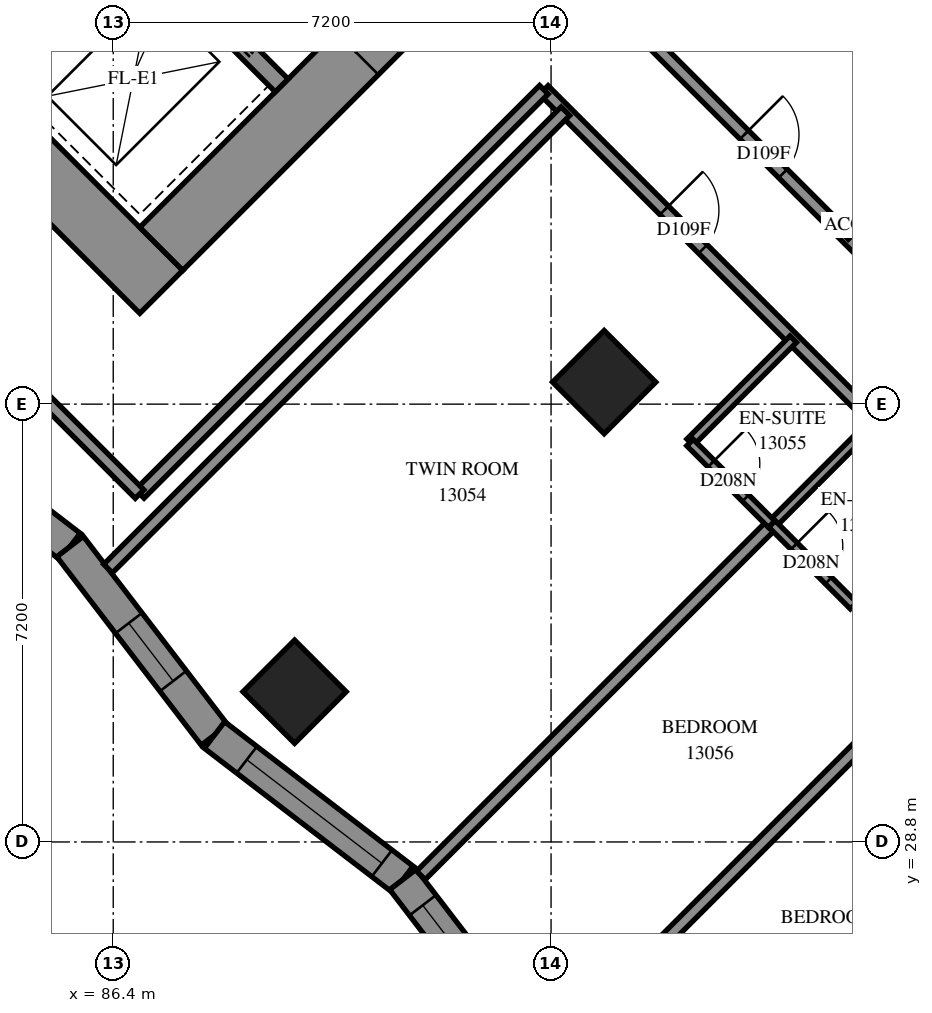
"""IFC4 building model, lengths in metres.
Left out: names, types, materials, properties, quantities, classifications, styles, units other than length and angle.
Written with IfcOpenShell. Run it as: python <this file> out.ifc"""

import sys

from ifc_helpers import new_model, si_unit, direction, frame, frame_2d, origin, origin_2d, place, context, subcontext, project, spatial, polyline, rectangle, outline, extrude, element, fill, save


model = new_model("IFC4")
c1 = context("Model", 3, precision=1e-05, world=origin(), true_north=direction((0.0, 1.0)))
c2 = subcontext(c1, "Body", "Model", "MODEL_VIEW")
j1 = project(units=[si_unit("LENGTHUNIT", "METRE"), si_unit("PLANEANGLEUNIT", "RADIAN")], contexts=[c1])
p1 = place(None, origin())
s1 = spatial("IfcSite", under=j1, at=p1, CompositionType="ELEMENT")
p2 = place(p1, origin())
s2 = spatial("IfcBuilding", under=s1, at=p2, CompositionType="ELEMENT")
p3 = place(p2, frame((0.0, 0.0, 50.8)))
s3 = spatial("IfcBuildingStorey", under=s2, at=p3, CompositionType="ELEMENT", Elevation=50.8)
for number, where, z_axis, x_axis in (
    (1, (94.474, 36.362, 0.0), (0.0, 0.0, 1.0), (0.707, -0.707, 0.0)),
    (2, (89.382, 31.271, 0.0), (0.0, 0.0, 1.0), (0.707, -0.707, 0.0)),
):
    element("IfcColumn", number, at=place(p3, frame(where, z_axis=z_axis, x_axis=x_axis)), inside=s3, PredefinedType="COLUMN", context=c2, shape_type="SweptSolid", body=[
        extrude(rectangle(XDim=1.2, YDim=1.2, at=origin_2d()), origin(), (0.0, 0.0, 1.0), 3.1),
    ])
p4 = place(p3, frame((75.594, 49.443, -0.3), z_axis=(0.0, 0.0, 1.0), x_axis=(0.7071037324, -0.70710983, 0.0)))
e3 = element("IfcWall", 3, at=p4, inside=s3, PredefinedType="SHEAR", context=c2, shape_type="SweptSolid", body=[
    extrude(rectangle(XDim=16.4, YDim=1.0, at=frame_2d((8.2, 0.0))), origin(), (0.0, 0.0, 1.0), 2.7),
])
p5 = place(p3, frame((87.19, 38.554, -0.3), z_axis=(0.0, 0.0, 1.0), x_axis=(0.707103309, 0.7071102534, 0.0)))
e4 = element("IfcWall", 4, at=p5, inside=s3, PredefinedType="SHEAR", context=c2, shape_type="SweptSolid", body=[
    extrude(rectangle(XDim=14.4, YDim=1.0, at=frame_2d((7.2, 0.0))), origin(), (0.0, 0.0, 1.0), 2.7),
])
p6 = place(p5, frame((4.55, 0.0, 0.3)))
e5 = element("IfcOpeningElement", 5, at=p6, cuts=e4, PredefinedType="OPENING", context=c2, shape_type="SweptSolid", body=[
    extrude(rectangle(XDim=1.1, YDim=2.1, at=frame_2d((0.55, 1.05))), frame((0.0, 0.51, 0.0), z_axis=(0.0, -1.0, 0.0), x_axis=(1.0, 0.0, 0.0)), (0.0, 0.0, 1.0), 1.02),
])
p7 = place(p5, frame((11.35, 0.0, 0.3)))
e6 = element("IfcOpeningElement", 6, at=p7, cuts=e4, PredefinedType="OPENING", context=c2, shape_type="SweptSolid", body=[
    extrude(rectangle(XDim=1.1, YDim=2.1, at=frame_2d((0.55, 1.05))), frame((0.0, 0.51, 0.0), z_axis=(0.0, -1.0, 0.0), x_axis=(1.0, 0.0, 0.0)), (0.0, 0.0, 1.0), 1.02),
])
p8 = place(p3, frame((84.291, 41.453, 0.0), z_axis=(0.0, 0.0, 1.0), x_axis=(0.7071067812, 0.7071067812, 0.0)))
e7 = element("IfcWall", 7, at=p8, inside=s3, PredefinedType="SOLIDWALL", context=c2, shape_type="SweptSolid", body=[
    extrude(rectangle(XDim=3.3, YDim=0.3, at=frame_2d((1.65, 0.0))), origin(), (0.0, 0.0, 1.0), 3.1),
])
p9 = place(p3, frame((78.988, 51.423, 0.0), z_axis=(0.0, 0.0, 1.0), x_axis=(0.7071067812, -0.7071067812, 0.0)))
e8 = element("IfcWall", 8, at=p9, inside=s3, PredefinedType="SOLIDWALL", context=c2, shape_type="SweptSolid", body=[
    extrude(rectangle(XDim=14.4, YDim=0.3, at=frame_2d((7.2, 0.0))), origin(), (0.0, 0.0, 1.0), 3.1),
])
p10 = place(p9, frame((1.25, 0.0, 0.0)))
e9 = element("IfcOpeningElement", 9, at=p10, cuts=e8, PredefinedType="OPENING", context=c2, shape_type="SweptSolid", body=[
    extrude(rectangle(XDim=1.1, YDim=2.1, at=frame_2d((0.55, 1.05))), frame((0.0, 0.16, 0.0), z_axis=(0.0, -1.0, 0.0), x_axis=(1.0, 0.0, 0.0)), (0.0, 0.0, 1.0), 0.32),
])
p11 = place(p9, frame((4.85, 0.0, 0.0)))
e10 = element("IfcOpeningElement", 10, at=p11, cuts=e8, PredefinedType="OPENING", context=c2, shape_type="SweptSolid", body=[
    extrude(rectangle(XDim=1.1, YDim=2.1, at=frame_2d((0.55, 1.05))), frame((0.0, 0.16, 0.0), z_axis=(0.0, -1.0, 0.0), x_axis=(1.0, 0.0, 0.0)), (0.0, 0.0, 1.0), 0.32),
])
p12 = place(p9, frame((8.45, 0.0, 0.0)))
e11 = element("IfcOpeningElement", 11, at=p12, cuts=e8, PredefinedType="OPENING", context=c2, shape_type="SweptSolid", body=[
    extrude(rectangle(XDim=1.1, YDim=2.1, at=frame_2d((0.55, 1.05))), frame((0.0, 0.16, 0.0), z_axis=(0.0, -1.0, 0.0), x_axis=(1.0, 0.0, 0.0)), (0.0, 0.0, 1.0), 0.32),
])
p13 = place(p9, frame((12.05, 0.0, 0.0)))
e12 = element("IfcOpeningElement", 12, at=p13, cuts=e8, PredefinedType="OPENING", context=c2, shape_type="SweptSolid", body=[
    extrude(rectangle(XDim=1.1, YDim=2.1, at=frame_2d((0.55, 1.05))), frame((0.0, 0.16, 0.0), z_axis=(0.0, -1.0, 0.0), x_axis=(1.0, 0.0, 0.0)), (0.0, 0.0, 1.0), 0.32),
])
p14 = place(p3, frame((82.591, 36.034, 0.0), z_axis=(0.0, 0.0, 1.0), x_axis=(0.7937155717, -0.6082890689, 0.0)))
e13 = element("IfcWall", 13, at=p14, inside=s3, PredefinedType="SOLIDWALL", context=c2, shape_type="SweptSolid", body=[
    extrude(outline(polyline([(-0.036, -0.275), (3.869, -0.275), (3.941, 0.275), (0.036, 0.275), (-0.036, -0.275)])), origin(), (0.0, 0.0, 1.0), 3.1),
])
p15 = place(p14, frame((1.742, 0.0, 0.5)))
e14 = element("IfcOpeningElement", 14, at=p15, cuts=e13, PredefinedType="OPENING", context=c2, shape_type="SweptSolid", body=[
    extrude(rectangle(XDim=1.2, YDim=2.45, at=frame_2d((0.6, 1.225))), frame((0.0, 0.285, 0.0), z_axis=(0.0, -1.0, 0.0), x_axis=(1.0, 0.0, 0.0)), (0.0, 0.0, 1.0), 0.57),
])
p16 = place(p3, frame((85.69, 33.658, 0.0), z_axis=(0.0, 0.0, 1.0), x_axis=(0.6082890689, -0.7937155717, 0.0)))
e15 = element("IfcWall", 15, at=p16, inside=s3, PredefinedType="SOLIDWALL", context=c2, shape_type="SweptSolid", body=[
    extrude(outline(polyline([(0.036, -0.275), (3.941, -0.275), (3.869, 0.275), (-0.036, 0.275), (0.036, -0.275)])), origin(), (0.0, 0.0, 1.0), 3.1),
])
p17 = place(p16, frame((1.587, 0.0, 0.5)))
e16 = element("IfcOpeningElement", 16, at=p17, cuts=e15, PredefinedType="OPENING", context=c2, shape_type="SweptSolid", body=[
    extrude(rectangle(XDim=1.2, YDim=2.45, at=frame_2d((0.6, 1.225))), frame((0.0, 0.285, 0.0), z_axis=(0.0, -1.0, 0.0), x_axis=(1.0, 0.0, 0.0)), (0.0, 0.0, 1.0), 0.57),
])
p18 = place(p3, frame((88.065, 30.559, 0.0), z_axis=(0.0, 0.0, 1.0), x_axis=(0.7937184601, -0.6082852999, 0.0)))
e17 = element("IfcWall", 17, at=p18, inside=s3, PredefinedType="SOLIDWALL", context=c2, shape_type="SweptSolid", body=[
    extrude(outline(polyline([(-0.036, -0.275), (3.869, -0.275), (3.941, 0.275), (0.036, 0.275), (-0.036, -0.275)])), origin(), (0.0, 0.0, 1.0), 3.1),
])
p19 = place(p18, frame((0.668, 0.0, 0.5)))
e18 = element("IfcOpeningElement", 18, at=p19, cuts=e17, PredefinedType="OPENING", context=c2, shape_type="SweptSolid", body=[
    extrude(rectangle(XDim=2.8, YDim=2.45, at=frame_2d((1.4, 1.225))), frame((0.0, 0.285, 0.0), z_axis=(0.0, -1.0, 0.0), x_axis=(1.0, 0.0, 0.0)), (0.0, 0.0, 1.0), 0.57),
])
p20 = place(p3, frame((91.165, 28.183, 0.0), z_axis=(0.0, 0.0, 1.0), x_axis=(0.6082890689, -0.7937155717, 0.0)))
e19 = element("IfcWall", 19, at=p20, inside=s3, PredefinedType="SOLIDWALL", context=c2, shape_type="SweptSolid", body=[
    extrude(outline(polyline([(0.036, -0.275), (3.941, -0.275), (3.869, 0.275), (-0.036, 0.275), (0.036, -0.275)])), origin(), (0.0, 0.0, 1.0), 3.1),
])
p21 = place(p20, frame((0.534, 0.0, 0.5)))
e20 = element("IfcOpeningElement", 20, at=p21, cuts=e19, PredefinedType="OPENING", context=c2, shape_type="SweptSolid", body=[
    extrude(rectangle(XDim=2.8, YDim=2.45, at=frame_2d((1.4, 1.225))), frame((0.0, 0.285, 0.0), z_axis=(0.0, -1.0, 0.0), x_axis=(1.0, 0.0, 0.0)), (0.0, 0.0, 1.0), 0.57),
])
p22 = place(p3, frame((93.481, 41.167, 0.0), z_axis=(0.0, 0.0, 1.0), x_axis=(0.7071067812, -0.7071067812, 0.0)))
e21 = element("IfcWall", 21, at=p22, inside=s3, PredefinedType="PARTITIONING", context=c2, shape_type="SweptSolid", body=[
    extrude(rectangle(XDim=25.699, YDim=0.2, at=frame_2d((12.85, 0.0))), origin(), (0.0, 0.0, 1.0), 3.1),
])
p23 = place(p22, frame((2.8, 0.0, 0.0)))
e22 = element("IfcOpeningElement", 22, at=p23, cuts=e21, PredefinedType="OPENING", context=c2, shape_type="SweptSolid", body=[
    extrude(rectangle(XDim=0.9, YDim=2.1, at=frame_2d((0.45, 1.05))), frame((0.0, 0.11, 0.0), z_axis=(0.0, -1.0, 0.0), x_axis=(1.0, 0.0, 0.0)), (0.0, 0.0, 1.0), 0.22),
])
p24 = place(p22, frame((9.948, 0.0, 0.0)))
e23 = element("IfcOpeningElement", 23, at=p24, cuts=e21, PredefinedType="OPENING", context=c2, shape_type="SweptSolid", body=[
    extrude(rectangle(XDim=0.9, YDim=2.1, at=frame_2d((0.45, 1.05))), frame((0.0, 0.11, 0.0), z_axis=(0.0, -1.0, 0.0), x_axis=(1.0, 0.0, 0.0)), (0.0, 0.0, 1.0), 0.22),
])
p25 = place(p22, frame((11.7, 0.0, 0.0)))
e24 = element("IfcOpeningElement", 24, at=p25, cuts=e21, PredefinedType="OPENING", context=c2, shape_type="SweptSolid", body=[
    extrude(rectangle(XDim=0.9, YDim=2.1, at=frame_2d((0.45, 1.05))), frame((0.0, 0.11, 0.0), z_axis=(0.0, -1.0, 0.0), x_axis=(1.0, 0.0, 0.0)), (0.0, 0.0, 1.0), 0.22),
])
p26 = place(p22, frame((17.25, 0.0, 0.0)))
e25 = element("IfcOpeningElement", 25, at=p26, cuts=e21, PredefinedType="OPENING", context=c2, shape_type="SweptSolid", body=[
    extrude(rectangle(XDim=0.9, YDim=2.1, at=frame_2d((0.45, 1.05))), frame((0.0, 0.11, 0.0), z_axis=(0.0, -1.0, 0.0), x_axis=(1.0, 0.0, 0.0)), (0.0, 0.0, 1.0), 0.22),
])
p27 = place(p22, frame((22.82, 0.0, 0.0)))
e26 = element("IfcOpeningElement", 26, at=p27, cuts=e21, PredefinedType="OPENING", context=c2, shape_type="SweptSolid", body=[
    extrude(rectangle(XDim=0.9, YDim=2.1, at=frame_2d((0.45, 1.05))), frame((0.0, 0.11, 0.0), z_axis=(0.0, -1.0, 0.0), x_axis=(1.0, 0.0, 0.0)), (0.0, 0.0, 1.0), 0.22),
])
p28 = place(p3, frame((86.314, 33.295, 0.0), z_axis=(0.0, 0.0, 1.0), x_axis=(0.7071020809, 0.7071114814, 0.0)))
e27 = element("IfcWall", 27, at=p28, inside=s3, PredefinedType="PARTITIONING", context=c2, shape_type="SweptSolid", body=[
    extrude(rectangle(XDim=10.638, YDim=0.2, at=frame_2d((5.319, 0.0))), origin(), (0.0, 0.0, 1.0), 3.1),
])
p29 = place(p3, frame((94.761, 42.446, 0.0), z_axis=(0.0, 0.0, 1.0), x_axis=(0.7071067812, -0.7071067812, 0.0)))
e28 = element("IfcWall", 28, at=p29, inside=s3, PredefinedType="PARTITIONING", context=c2, shape_type="SweptSolid", body=[
    extrude(rectangle(XDim=9.597, YDim=0.2, at=frame_2d((4.798, 0.0))), origin(), (0.0, 0.0, 1.0), 3.1),
])
p30 = place(p29, frame((2.851, 0.0, 0.0)))
e29 = element("IfcOpeningElement", 29, at=p30, cuts=e28, PredefinedType="OPENING", context=c2, shape_type="SweptSolid", body=[
    extrude(rectangle(XDim=0.9, YDim=2.1, at=frame_2d((0.45, 1.05))), frame((0.0, 0.11, 0.0), z_axis=(0.0, -1.0, 0.0), x_axis=(1.0, 0.0, 0.0)), (0.0, 0.0, 1.0), 0.22),
])
p31 = place(p3, frame((86.836, 34.524, 0.0), z_axis=(0.0, 0.0, 1.0), x_axis=(0.7071067812, 0.7071067812, 0.0)))
e30 = element("IfcWall", 30, at=p31, inside=s3, PredefinedType="PARTITIONING", context=c2, shape_type="SweptSolid", body=[
    extrude(rectangle(XDim=9.399, YDim=0.2, at=frame_2d((4.699, 0.0))), origin(), (0.0, 0.0, 1.0), 3.1),
])
p32 = place(p3, frame((96.526, 23.142, 0.0), z_axis=(0.0, 0.0, 1.0), x_axis=(0.7071128801, 0.7071006822, 0.0)))
e31 = element("IfcWall", 31, at=p32, inside=s3, PredefinedType="PARTITIONING", context=c2, shape_type="SweptSolid", body=[
    extrude(rectangle(XDim=8.198, YDim=0.2, at=frame_2d((4.099, 0.0))), origin(), (0.0, 0.0, 1.0), 3.1),
])
p33 = place(p3, frame((91.459, 28.251, 0.0), z_axis=(0.0, 0.0, 1.0), x_axis=(0.7072230972, 0.706990446, 0.0)))
e32 = element("IfcWall", 32, at=p33, inside=s3, PredefinedType="PARTITIONING", context=c2, shape_type="SweptSolid", body=[
    extrude(rectangle(XDim=8.167, YDim=0.2, at=frame_2d((4.083, 0.0))), origin(), (0.0, 0.0, 1.0), 3.1),
])
p34 = place(p3, frame((95.073, 26.781, 0.0), z_axis=(0.0, 0.0, 1.0), x_axis=(0.7071067812, 0.7071067812, 0.0)))
e33 = element("IfcWall", 33, at=p34, inside=s3, PredefinedType="PARTITIONING", context=c2, shape_type="SweptSolid", body=[
    extrude(rectangle(XDim=5.501, YDim=0.2, at=frame_2d((2.751, 0.0))), origin(), (0.0, 0.0, 1.0), 3.1),
])
p35 = place(p3, frame((84.889, 36.465, 0.0), z_axis=(0.0, 0.0, 1.0), x_axis=(0.7071067812, -0.7071067812, 0.0)))
e34 = element("IfcWall", 34, at=p35, inside=s3, PredefinedType="PARTITIONING", context=c2, shape_type="SweptSolid", body=[
    extrude(rectangle(XDim=2.749, YDim=0.2, at=frame_2d((1.375, 0.0))), origin(), (0.0, 0.0, 1.0), 3.1),
])
p36 = place(p3, frame((98.573, 32.685, 0.0), z_axis=(0.0, 0.0, 1.0), x_axis=(0.7071067812, 0.7071067812, 0.0)))
e35 = element("IfcWall", 35, at=p36, inside=s3, PredefinedType="PARTITIONING", context=c2, shape_type="SweptSolid", body=[
    extrude(rectangle(XDim=2.401, YDim=0.15, at=frame_2d((1.201, 0.0))), origin(), (0.0, 0.0, 1.0), 3.1),
])
for number, where, z_axis, x_axis in (
    (36, (97.234, 34.026, 0.0), (0.0, 0.0, 1.0), (0.707, 0.708, 0.0)),
    (37, (98.435, 38.765, 0.0), (0.0, 0.0, 1.0), (0.707, 0.708, 0.0)),
):
    element("IfcWall", number, at=place(p3, frame(where, z_axis=z_axis, x_axis=x_axis)), inside=s3, PredefinedType="PARTITIONING", context=c2, shape_type="SweptSolid", body=[
        extrude(rectangle(XDim=2.4, YDim=0.15, at=frame_2d((1.2, 0.0))), origin(), (0.0, 0.0, 1.0), 3.1),
    ])
p37 = place(p3, frame((95.887, 35.373, 0.0), z_axis=(0.0, 0.0, 1.0), x_axis=(0.7071067812, 0.7071067812, 0.0)))
e38 = element("IfcWall", 38, at=p37, inside=s3, PredefinedType="PARTITIONING", context=c2, shape_type="SweptSolid", body=[
    extrude(rectangle(XDim=2.398, YDim=0.15, at=frame_2d((1.199, 0.0))), origin(), (0.0, 0.0, 1.0), 3.1),
])
p38 = place(p3, frame((95.885, 35.369, 0.0), z_axis=(0.0, 0.0, 1.0), x_axis=(0.7071067812, -0.7071067812, 0.0)))
e39 = element("IfcWall", 39, at=p38, inside=s3, PredefinedType="PARTITIONING", context=c2, shape_type="SweptSolid", body=[
    extrude(rectangle(XDim=1.901, YDim=0.15, at=frame_2d((0.95, 0.0))), origin(), (0.0, 0.0, 1.0), 3.1),
])
p39 = place(p38, frame((0.493, 0.0, 0.0)))
e40 = element("IfcOpeningElement", 40, at=p39, cuts=e39, PredefinedType="OPENING", context=c2, shape_type="SweptSolid", body=[
    extrude(rectangle(XDim=0.8, YDim=2.1, at=frame_2d((0.4, 1.05))), frame((0.0, 0.085, 0.0), z_axis=(0.0, -1.0, 0.0), x_axis=(1.0, 0.0, 0.0)), (0.0, 0.0, 1.0), 0.17),
])
p40 = place(p3, frame((97.233, 34.029, 0.0), z_axis=(0.0, 0.0, 1.0), x_axis=(0.7065800724, -0.7076330979, 0.0)))
e41 = element("IfcWall", 41, at=p40, inside=s3, PredefinedType="PARTITIONING", context=c2, shape_type="SweptSolid", body=[
    extrude(rectangle(XDim=1.899, YDim=0.15, at=frame_2d((0.95, 0.0))), origin(), (0.0, 0.0, 1.0), 3.1),
])
p41 = place(p40, frame((0.515, 0.0, 0.0)))
e42 = element("IfcOpeningElement", 42, at=p41, cuts=e41, PredefinedType="OPENING", context=c2, shape_type="SweptSolid", body=[
    extrude(rectangle(XDim=0.8, YDim=2.1, at=frame_2d((0.4, 1.05))), frame((0.0, 0.085, 0.0), z_axis=(0.0, -1.0, 0.0), x_axis=(1.0, 0.0, 0.0)), (0.0, 0.0, 1.0), 0.17),
])
p42 = place(p17, origin())
e43 = element("IfcWindow", 43, at=p42, inside=s3, PartitioningType="SINGLE_PANEL", PredefinedType="WINDOW", context=c2, shape_type="SweptSolid", body=[
    extrude(rectangle(XDim=1.2, YDim=2.45, at=frame_2d((0.6, 1.225))), frame((0.0, 0.155, 0.0), z_axis=(0.0, -1.0, 0.0), x_axis=(1.0, 0.0, 0.0)), (0.0, 0.0, 1.0), 0.06),
])
fill(e16, e43)
p43 = place(p19, origin())
e44 = element("IfcWindow", 44, at=p43, inside=s3, PartitioningType="SINGLE_PANEL", PredefinedType="WINDOW", context=c2, shape_type="SweptSolid", body=[
    extrude(rectangle(XDim=2.8, YDim=2.45, at=frame_2d((1.4, 1.225))), frame((0.0, 0.155, 0.0), z_axis=(0.0, -1.0, 0.0), x_axis=(1.0, 0.0, 0.0)), (0.0, 0.0, 1.0), 0.06),
])
fill(e18, e44)
p44 = place(p21, origin())
e45 = element("IfcWindow", 45, at=p44, inside=s3, PartitioningType="SINGLE_PANEL", PredefinedType="WINDOW", context=c2, shape_type="SweptSolid", body=[
    extrude(rectangle(XDim=2.8, YDim=2.45, at=frame_2d((1.4, 1.225))), frame((0.0, 0.155, 0.0), z_axis=(0.0, -1.0, 0.0), x_axis=(1.0, 0.0, 0.0)), (0.0, 0.0, 1.0), 0.06),
])
fill(e20, e45)
p45 = place(p6, origin())
e46 = element("IfcDoor", 46, at=p45, inside=s3, OperationType="DOUBLE_DOOR_SINGLE_SWING", PredefinedType="DOOR", context=c2, shape_type="SweptSolid", body=[
    extrude(rectangle(XDim=1.1, YDim=2.1, at=frame_2d((0.55, 1.05))), frame((0.0, 0.025, 0.0), z_axis=(0.0, -1.0, 0.0), x_axis=(1.0, 0.0, 0.0)), (0.0, 0.0, 1.0), 0.05),
])
fill(e5, e46)
p46 = place(p30, origin())
e47 = element("IfcDoor", 47, at=p46, inside=s3, OperationType="SINGLE_SWING_RIGHT", PredefinedType="DOOR", context=c2, shape_type="SweptSolid", body=[
    extrude(rectangle(XDim=0.9, YDim=2.1, at=frame_2d((0.45, 1.05))), frame((0.0, 0.025, 0.0), z_axis=(0.0, -1.0, 0.0), x_axis=(1.0, 0.0, 0.0)), (0.0, 0.0, 1.0), 0.05),
])
fill(e29, e47)
p47 = place(p23, origin())
e48 = element("IfcDoor", 48, at=p47, inside=s3, OperationType="SINGLE_SWING_LEFT", PredefinedType="DOOR", context=c2, shape_type="SweptSolid", body=[
    extrude(rectangle(XDim=0.9, YDim=2.1, at=frame_2d((0.45, 1.05))), frame((0.0, 0.025, 0.0), z_axis=(0.0, -1.0, 0.0), x_axis=(1.0, 0.0, 0.0)), (0.0, 0.0, 1.0), 0.05),
])
fill(e22, e48)
p48 = place(p39, origin())
e49 = element("IfcDoor", 49, at=p48, inside=s3, OperationType="SINGLE_SWING_RIGHT", PredefinedType="DOOR", context=c2, shape_type="SweptSolid", body=[
    extrude(rectangle(XDim=0.8, YDim=2.1, at=frame_2d((0.4, 1.05))), frame((0.0, 0.025, 0.0), z_axis=(0.0, -1.0, 0.0), x_axis=(1.0, 0.0, 0.0)), (0.0, 0.0, 1.0), 0.05),
])
fill(e40, e49)
p49 = place(p41, origin())
e50 = element("IfcDoor", 50, at=p49, inside=s3, OperationType="SINGLE_SWING_RIGHT", PredefinedType="DOOR", context=c2, shape_type="SweptSolid", body=[
    extrude(rectangle(XDim=0.8, YDim=2.1, at=frame_2d((0.4, 1.05))), frame((0.0, 0.025, 0.0), z_axis=(0.0, -1.0, 0.0), x_axis=(1.0, 0.0, 0.0)), (0.0, 0.0, 1.0), 0.05),
])
fill(e42, e50)
save(model, sys.argv[1])
